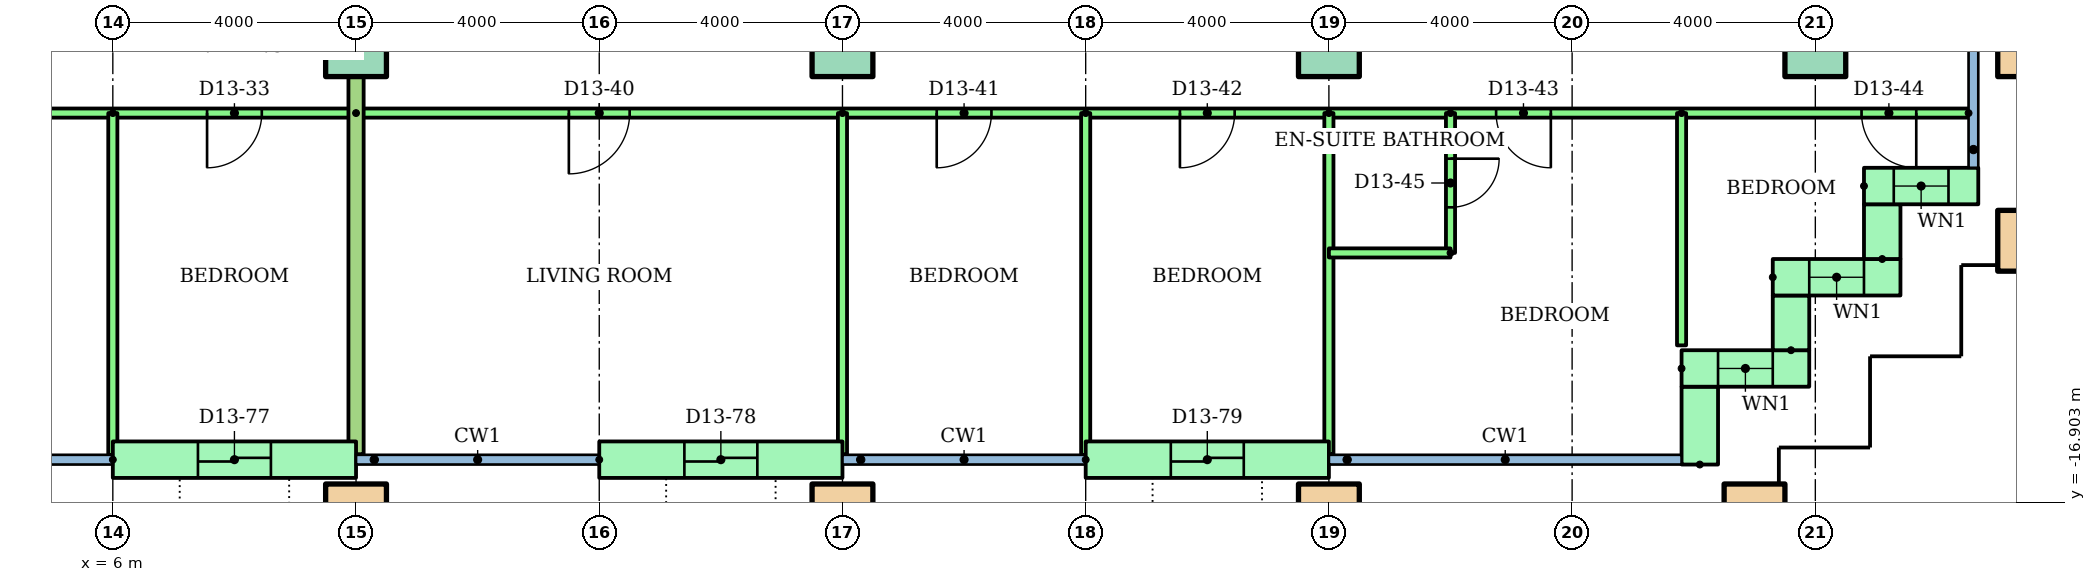
"""IFC4 building model, lengths in metres.
Left out: names, types, materials, properties, quantities, classifications, styles, units other than length and angle.
Written with IfcOpenShell. Run it as: python <this file> out.ifc"""

import sys

from ifc_helpers import new_model, si_unit, direction, frame, frame_2d, origin, origin_2d, place, context, subcontext, project, spatial, rectangle, hollow_rectangle, extrude, element, fill, save


model = new_model("IFC4")
c1 = context("Model", 3, precision=1e-05, world=origin(), true_north=direction((0.0, 1.0)))
c2 = subcontext(c1, "Body", "Model", "MODEL_VIEW")
j1 = project(units=[si_unit("LENGTHUNIT", "METRE"), si_unit("PLANEANGLEUNIT", "RADIAN")], contexts=[c1])
p1 = place(None, origin())
s1 = spatial("IfcSite", under=j1, at=p1, CompositionType="ELEMENT")
p2 = place(p1, origin())
s2 = spatial("IfcBuilding", under=s1, at=p2, CompositionType="ELEMENT")
p3 = place(p2, frame((0.0, 0.0, 51.2)))
s3 = spatial("IfcBuildingStorey", under=s2, at=p3, CompositionType="ELEMENT", Elevation=51.2)
for number, where in (
    (1, (10.0, -17.1, 0.0)),
    (2, (18.0, -17.1, 0.0)),
    (3, (26.0, -17.1, 0.0)),
    (4, (33.0, -17.1, 0.0)),
    (5, (37.5, -12.6, 0.0)),
):
    element("IfcColumn", number, at=place(p3, frame(where)), inside=s3, PredefinedType="COLUMN", context=c2, shape_type="SweptSolid", body=[
        extrude(hollow_rectangle(XDim=1.0, YDim=1.0, WallThickness=0.05, at=origin_2d()), origin(), (0.0, 0.0, 1.0), 3.2),
    ])
for number, where in (
    (6, (10.0, -9.4, 0.0)),
    (7, (18.0, -9.4, 0.0)),
    (8, (26.0, -9.4, 0.0)),
    (9, (34.0, -9.4, 0.0)),
):
    element("IfcColumn", number, at=place(p3, frame(where)), inside=s3, PredefinedType="COLUMN", context=c2, shape_type="SweptSolid", body=[
        extrude(rectangle(XDim=1.0, YDim=1.0, at=origin_2d()), origin(), (0.0, 0.0, 1.0), 3.2),
    ])
p4 = place(p3, frame((37.5, -9.4, 0.0)))
e10 = element("IfcColumn", 10, at=p4, inside=s3, PredefinedType="COLUMN", context=c2, shape_type="SweptSolid", body=[
    extrude(hollow_rectangle(XDim=1.0, YDim=1.0, WallThickness=0.05, at=origin_2d()), origin(), (0.0, 0.0, 1.0), 3.2),
])
p5 = place(p3, frame((6.0, -16.2, 0.0)))
e11 = element("IfcWall", 11, at=p5, inside=s3, PredefinedType="STANDARD", context=c2, shape_type="SweptSolid", body=[
    extrude(rectangle(XDim=4.0, YDim=0.6, at=frame_2d((2.0, 0.0))), origin(), (0.0, 0.0, 1.0), 2.92),
])
p6 = place(p5, frame((1.4, 0.0, 0.0)))
e12 = element("IfcOpeningElement", 12, at=p6, cuts=e11, PredefinedType="OPENING", context=c2, shape_type="SweptSolid", body=[
    extrude(rectangle(XDim=1.2, YDim=2.1, at=frame_2d((0.6, 1.05))), frame((0.0, 0.31, 0.0), z_axis=(0.0, -1.0, 0.0), x_axis=(1.0, 0.0, 0.0)), (0.0, 0.0, 1.0), 0.62),
])
p7 = place(p3, frame((14.0, -16.2, 0.0)))
e13 = element("IfcWall", 13, at=p7, inside=s3, PredefinedType="STANDARD", context=c2, shape_type="SweptSolid", body=[
    extrude(rectangle(XDim=4.0, YDim=0.6, at=frame_2d((2.0, 0.0))), origin(), (0.0, 0.0, 1.0), 2.92),
])
p8 = place(p7, frame((1.4, 0.0, 0.0)))
e14 = element("IfcOpeningElement", 14, at=p8, cuts=e13, PredefinedType="OPENING", context=c2, shape_type="SweptSolid", body=[
    extrude(rectangle(XDim=1.2, YDim=2.1, at=frame_2d((0.6, 1.05))), frame((0.0, 0.31, 0.0), z_axis=(0.0, -1.0, 0.0), x_axis=(1.0, 0.0, 0.0)), (0.0, 0.0, 1.0), 0.62),
])
p9 = place(p3, frame((22.0, -16.2, 0.0)))
e15 = element("IfcWall", 15, at=p9, inside=s3, PredefinedType="STANDARD", context=c2, shape_type="SweptSolid", body=[
    extrude(rectangle(XDim=4.0, YDim=0.6, at=frame_2d((2.0, 0.0))), origin(), (0.0, 0.0, 1.0), 2.92),
])
p10 = place(p9, frame((1.4, 0.0, 0.0)))
e16 = element("IfcOpeningElement", 16, at=p10, cuts=e15, PredefinedType="OPENING", context=c2, shape_type="SweptSolid", body=[
    extrude(rectangle(XDim=1.2, YDim=2.1, at=frame_2d((0.6, 1.05))), frame((0.0, 0.31, 0.0), z_axis=(0.0, -1.0, 0.0), x_axis=(1.0, 0.0, 0.0)), (0.0, 0.0, 1.0), 0.62),
])
p11 = place(p3, frame((32.1, -16.28, 0.0), z_axis=(0.0, 0.0, 1.0), x_axis=(0.0, 1.0, 0.0)))
e17 = element("IfcWall", 17, at=p11, inside=s3, PredefinedType="STANDARD", context=c2, shape_type="SweptSolid", body=[
    extrude(rectangle(XDim=1.28, YDim=0.6, at=frame_2d((0.64, 0.0))), origin(), (0.0, 0.0, 1.0), 2.92),
])
p12 = place(p3, frame((31.8, -14.7, 0.0)))
e18 = element("IfcWall", 18, at=p12, inside=s3, PredefinedType="STANDARD", context=c2, shape_type="SweptSolid", body=[
    extrude(rectangle(XDim=2.1, YDim=0.6, at=frame_2d((1.05, 0.0))), origin(), (0.0, 0.0, 1.0), 2.92),
])
p13 = place(p12, frame((0.6, 0.0, 0.9)))
e19 = element("IfcOpeningElement", 19, at=p13, cuts=e18, PredefinedType="OPENING", context=c2, shape_type="SweptSolid", body=[
    extrude(rectangle(XDim=0.9, YDim=1.5, at=frame_2d((0.45, 0.75))), frame((0.0, 0.31, 0.0), z_axis=(0.0, -1.0, 0.0), x_axis=(1.0, 0.0, 0.0)), (0.0, 0.0, 1.0), 0.62),
])
p14 = place(p3, frame((33.6, -14.4, 0.0), z_axis=(0.0, 0.0, 1.0), x_axis=(0.0, 1.0, 0.0)))
e20 = element("IfcWall", 20, at=p14, inside=s3, PredefinedType="STANDARD", context=c2, shape_type="SweptSolid", body=[
    extrude(rectangle(XDim=0.9, YDim=0.6, at=frame_2d((0.45, 0.0))), origin(), (0.0, 0.0, 1.0), 2.92),
])
p15 = place(p3, frame((33.3, -13.2, 0.0)))
e21 = element("IfcWall", 21, at=p15, inside=s3, PredefinedType="STANDARD", context=c2, shape_type="SweptSolid", body=[
    extrude(rectangle(XDim=2.1, YDim=0.6, at=frame_2d((1.05, 0.0))), origin(), (0.0, 0.0, 1.0), 2.92),
])
p16 = place(p15, frame((0.6, 0.0, 0.9)))
e22 = element("IfcOpeningElement", 22, at=p16, cuts=e21, PredefinedType="OPENING", context=c2, shape_type="SweptSolid", body=[
    extrude(rectangle(XDim=0.9, YDim=1.5, at=frame_2d((0.45, 0.75))), frame((0.0, 0.31, 0.0), z_axis=(0.0, -1.0, 0.0), x_axis=(1.0, 0.0, 0.0)), (0.0, 0.0, 1.0), 0.62),
])
p17 = place(p3, frame((35.1, -12.9, 0.0), z_axis=(0.0, 0.0, 1.0), x_axis=(0.0, 1.0, 0.0)))
e23 = element("IfcWall", 23, at=p17, inside=s3, PredefinedType="STANDARD", context=c2, shape_type="SweptSolid", body=[
    extrude(rectangle(XDim=0.9, YDim=0.6, at=frame_2d((0.45, 0.0))), origin(), (0.0, 0.0, 1.0), 2.92),
])
p18 = place(p3, frame((34.8, -11.7, 0.0)))
e24 = element("IfcWall", 24, at=p18, inside=s3, PredefinedType="STANDARD", context=c2, shape_type="SweptSolid", body=[
    extrude(rectangle(XDim=1.88, YDim=0.6, at=frame_2d((0.94, 0.0))), origin(), (0.0, 0.0, 1.0), 2.92),
])
p19 = place(p18, frame((0.49, 0.0, 0.9)))
e25 = element("IfcOpeningElement", 25, at=p19, cuts=e24, PredefinedType="OPENING", context=c2, shape_type="SweptSolid", body=[
    extrude(rectangle(XDim=0.9, YDim=1.5, at=frame_2d((0.45, 0.75))), frame((0.0, 0.31, 0.0), z_axis=(0.0, -1.0, 0.0), x_axis=(1.0, 0.0, 0.0)), (0.0, 0.0, 1.0), 0.62),
])
p20 = place(p3, frame((10.0, -10.5, 0.0), z_axis=(0.0, 0.0, 1.0), x_axis=(-1.0, 0.0, 0.0)))
e26 = element("IfcWall", 26, at=p20, inside=s3, PredefinedType="PARTITIONING", context=c2, shape_type="SweptSolid", body=[
    extrude(rectangle(XDim=24.0, YDim=0.15, at=frame_2d((12.0, 0.0))), origin(), (0.0, 0.0, 1.0), 2.4),
])
p21 = place(p20, frame((19.5, 0.0, 0.0)))
e27 = element("IfcOpeningElement", 27, at=p21, cuts=e26, PredefinedType="OPENING", context=c2, shape_type="SweptSolid", body=[
    extrude(rectangle(XDim=1.0, YDim=2.1, at=frame_2d((0.5, 1.05))), frame((0.0, 0.085, 0.0), z_axis=(0.0, -1.0, 0.0), x_axis=(1.0, 0.0, 0.0)), (0.0, 0.0, 1.0), 0.17),
])
p22 = place(p20, frame((13.55, 0.0, 0.0)))
e28 = element("IfcOpeningElement", 28, at=p22, cuts=e26, PredefinedType="OPENING", context=c2, shape_type="SweptSolid", body=[
    extrude(rectangle(XDim=0.9, YDim=2.1, at=frame_2d((0.45, 1.05))), frame((0.0, 0.085, 0.0), z_axis=(0.0, -1.0, 0.0), x_axis=(1.0, 0.0, 0.0)), (0.0, 0.0, 1.0), 0.17),
])
p23 = place(p20, frame((9.55, 0.0, 0.0)))
e29 = element("IfcOpeningElement", 29, at=p23, cuts=e26, PredefinedType="OPENING", context=c2, shape_type="SweptSolid", body=[
    extrude(rectangle(XDim=0.9, YDim=2.1, at=frame_2d((0.45, 1.05))), frame((0.0, 0.085, 0.0), z_axis=(0.0, -1.0, 0.0), x_axis=(1.0, 0.0, 0.0)), (0.0, 0.0, 1.0), 0.17),
])
p24 = place(p20, frame((5.55, 0.0, 0.0)))
e30 = element("IfcOpeningElement", 30, at=p24, cuts=e26, PredefinedType="OPENING", context=c2, shape_type="SweptSolid", body=[
    extrude(rectangle(XDim=0.9, YDim=2.1, at=frame_2d((0.45, 1.05))), frame((0.0, 0.085, 0.0), z_axis=(0.0, -1.0, 0.0), x_axis=(1.0, 0.0, 0.0)), (0.0, 0.0, 1.0), 0.17),
])
p25 = place(p20, frame((1.55, 0.0, 0.0)))
e31 = element("IfcOpeningElement", 31, at=p25, cuts=e26, PredefinedType="OPENING", context=c2, shape_type="SweptSolid", body=[
    extrude(rectangle(XDim=0.9, YDim=2.1, at=frame_2d((0.45, 1.05))), frame((0.0, 0.085, 0.0), z_axis=(0.0, -1.0, 0.0), x_axis=(1.0, 0.0, 0.0)), (0.0, 0.0, 1.0), 0.17),
])
p26 = place(p3, frame((6.0, -10.5, 0.0), z_axis=(0.0, 0.0, 1.0), x_axis=(0.0, -1.0, 0.0)))
e32 = element("IfcWall", 32, at=p26, inside=s3, PredefinedType="PARTITIONING", context=c2, shape_type="SweptSolid", body=[
    extrude(rectangle(XDim=5.621, YDim=0.15, at=frame_2d((2.811, 0.0))), origin(), (0.0, 0.0, 1.0), 2.4),
])
p27 = place(p3, frame((36.52, -10.5, 0.0), z_axis=(0.0, 0.0, 1.0), x_axis=(-1.0, 0.0, 0.0)))
e33 = element("IfcWall", 33, at=p27, inside=s3, PredefinedType="PARTITIONING", context=c2, shape_type="SweptSolid", body=[
    extrude(rectangle(XDim=26.52, YDim=0.15, at=frame_2d((13.26, 0.0))), origin(), (0.0, 0.0, 1.0), 2.4),
])
p28 = place(p27, frame((22.02, 0.0, 0.0)))
e34 = element("IfcOpeningElement", 34, at=p28, cuts=e33, PredefinedType="OPENING", context=c2, shape_type="SweptSolid", body=[
    extrude(rectangle(XDim=1.0, YDim=2.1, at=frame_2d((0.5, 1.05))), frame((0.0, 0.085, 0.0), z_axis=(0.0, -1.0, 0.0), x_axis=(1.0, 0.0, 0.0)), (0.0, 0.0, 1.0), 0.17),
])
p29 = place(p27, frame((16.07, 0.0, 0.0)))
e35 = element("IfcOpeningElement", 35, at=p29, cuts=e33, PredefinedType="OPENING", context=c2, shape_type="SweptSolid", body=[
    extrude(rectangle(XDim=0.9, YDim=2.1, at=frame_2d((0.45, 1.05))), frame((0.0, 0.085, 0.0), z_axis=(0.0, -1.0, 0.0), x_axis=(1.0, 0.0, 0.0)), (0.0, 0.0, 1.0), 0.17),
])
p30 = place(p27, frame((12.07, 0.0, 0.0)))
e36 = element("IfcOpeningElement", 36, at=p30, cuts=e33, PredefinedType="OPENING", context=c2, shape_type="SweptSolid", body=[
    extrude(rectangle(XDim=0.9, YDim=2.1, at=frame_2d((0.45, 1.05))), frame((0.0, 0.085, 0.0), z_axis=(0.0, -1.0, 0.0), x_axis=(1.0, 0.0, 0.0)), (0.0, 0.0, 1.0), 0.17),
])
p31 = place(p27, frame((6.87, 0.0, 0.0)))
e37 = element("IfcOpeningElement", 37, at=p31, cuts=e33, PredefinedType="OPENING", context=c2, shape_type="SweptSolid", body=[
    extrude(rectangle(XDim=0.9, YDim=2.1, at=frame_2d((0.45, 1.05))), frame((0.0, 0.085, 0.0), z_axis=(0.0, -1.0, 0.0), x_axis=(1.0, 0.0, 0.0)), (0.0, 0.0, 1.0), 0.17),
])
p32 = place(p27, frame((0.86, 0.0, 0.0)))
e38 = element("IfcOpeningElement", 38, at=p32, cuts=e33, PredefinedType="OPENING", context=c2, shape_type="SweptSolid", body=[
    extrude(rectangle(XDim=0.9, YDim=2.1, at=frame_2d((0.45, 1.05))), frame((0.0, 0.085, 0.0), z_axis=(0.0, -1.0, 0.0), x_axis=(1.0, 0.0, 0.0)), (0.0, 0.0, 1.0), 0.17),
])
p33 = place(p3, frame((18.0, -10.5, 0.0), z_axis=(0.0, 0.0, 1.0), x_axis=(0.0, -1.0, 0.0)))
e39 = element("IfcWall", 39, at=p33, inside=s3, PredefinedType="PARTITIONING", context=c2, shape_type="SweptSolid", body=[
    extrude(rectangle(XDim=5.61, YDim=0.15, at=frame_2d((2.805, 0.0))), origin(), (0.0, 0.0, 1.0), 2.4),
])
p34 = place(p3, frame((22.0, -10.5, 0.0), z_axis=(0.0, 0.0, 1.0), x_axis=(0.0, -1.0, 0.0)))
e40 = element("IfcWall", 40, at=p34, inside=s3, PredefinedType="PARTITIONING", context=c2, shape_type="SweptSolid", body=[
    extrude(rectangle(XDim=5.621, YDim=0.15, at=frame_2d((2.811, 0.0))), origin(), (0.0, 0.0, 1.0), 2.4),
])
p35 = place(p3, frame((26.0, -10.5, 0.0), z_axis=(0.0, 0.0, 1.0), x_axis=(0.0, -1.0, 0.0)))
e41 = element("IfcWall", 41, at=p35, inside=s3, PredefinedType="PARTITIONING", context=c2, shape_type="SweptSolid", body=[
    extrude(rectangle(XDim=5.61, YDim=0.15, at=frame_2d((2.805, 0.0))), origin(), (0.0, 0.0, 1.0), 2.4),
])
p36 = place(p3, frame((31.8, -10.5, 0.0), z_axis=(0.0, 0.0, 1.0), x_axis=(0.0, -1.0, 0.0)))
e42 = element("IfcWall", 42, at=p36, inside=s3, PredefinedType="PARTITIONING", context=c2, shape_type="SweptSolid", body=[
    extrude(rectangle(XDim=3.82, YDim=0.15, at=frame_2d((1.91, 0.0))), origin(), (0.0, 0.0, 1.0), 2.4),
])
p37 = place(p3, frame((28.0, -10.5, 0.0), z_axis=(0.0, 0.0, 1.0), x_axis=(0.0, -1.0, 0.0)))
e43 = element("IfcWall", 43, at=p37, inside=s3, PredefinedType="PARTITIONING", context=c2, shape_type="SweptSolid", body=[
    extrude(rectangle(XDim=2.3, YDim=0.15, at=frame_2d((1.15, 0.0))), origin(), (0.0, 0.0, 1.0), 2.4),
])
p38 = place(p37, frame((0.75, 0.0, 0.0)))
e44 = element("IfcOpeningElement", 44, at=p38, cuts=e43, PredefinedType="OPENING", context=c2, shape_type="SweptSolid", body=[
    extrude(rectangle(XDim=0.8, YDim=2.1, at=frame_2d((0.4, 1.05))), frame((0.0, 0.085, 0.0), z_axis=(0.0, -1.0, 0.0), x_axis=(1.0, 0.0, 0.0)), (0.0, 0.0, 1.0), 0.17),
])
p39 = place(p3, frame((28.0, -12.8, 0.0), z_axis=(0.0, 0.0, 1.0), x_axis=(-1.0, 0.0, 0.0)))
e45 = element("IfcWall", 45, at=p39, inside=s3, PredefinedType="PARTITIONING", context=c2, shape_type="SweptSolid", body=[
    extrude(rectangle(XDim=2.0, YDim=0.15, at=frame_2d((1.0, 0.0))), origin(), (0.0, 0.0, 1.0), 2.4),
])
p40 = place(p3, frame((10.0, -1.4, 0.0), z_axis=(0.0, 0.0, 1.0), x_axis=(0.0, -1.0, 0.0)))
e46 = element("IfcWall", 46, at=p40, inside=s3, PredefinedType="PARTITIONING", context=c2, shape_type="SweptSolid", body=[
    extrude(rectangle(XDim=14.71, YDim=0.25, at=frame_2d((7.355, 0.0))), origin(), (0.0, 0.0, 1.0), 2.4),
])
p41 = place(p13, origin())
e47 = element("IfcWindow", 47, at=p41, inside=s3, PartitioningType="SINGLE_PANEL", PredefinedType="WINDOW", context=c2, shape_type="SweptSolid", body=[
    extrude(rectangle(XDim=0.9, YDim=1.5, at=frame_2d((0.45, 0.75))), frame((0.0, 0.03, 0.0), z_axis=(0.0, -1.0, 0.0), x_axis=(1.0, 0.0, 0.0)), (0.0, 0.0, 1.0), 0.06),
])
fill(e19, e47)
p42 = place(p16, origin())
e48 = element("IfcWindow", 48, at=p42, inside=s3, PartitioningType="SINGLE_PANEL", PredefinedType="WINDOW", context=c2, shape_type="SweptSolid", body=[
    extrude(rectangle(XDim=0.9, YDim=1.5, at=frame_2d((0.45, 0.75))), frame((0.0, 0.03, 0.0), z_axis=(0.0, -1.0, 0.0), x_axis=(1.0, 0.0, 0.0)), (0.0, 0.0, 1.0), 0.06),
])
fill(e22, e48)
p43 = place(p19, origin())
e49 = element("IfcWindow", 49, at=p43, inside=s3, PartitioningType="SINGLE_PANEL", PredefinedType="WINDOW", context=c2, shape_type="SweptSolid", body=[
    extrude(rectangle(XDim=0.9, YDim=1.5, at=frame_2d((0.45, 0.75))), frame((0.0, 0.03, 0.0), z_axis=(0.0, -1.0, 0.0), x_axis=(1.0, 0.0, 0.0)), (0.0, 0.0, 1.0), 0.06),
])
fill(e25, e49)
p44 = place(p25, origin())
e50 = element("IfcDoor", 50, at=p44, inside=s3, OperationType="SINGLE_SWING_RIGHT", PredefinedType="DOOR", context=c2, shape_type="SweptSolid", body=[
    extrude(rectangle(XDim=0.9, YDim=2.1, at=frame_2d((0.45, 1.05))), frame((0.0, 0.025, 0.0), z_axis=(0.0, -1.0, 0.0), x_axis=(1.0, 0.0, 0.0)), (0.0, 0.0, 1.0), 0.05),
])
fill(e31, e50)
p45 = place(p28, origin())
e51 = element("IfcDoor", 51, at=p45, inside=s3, OperationType="SINGLE_SWING_RIGHT", PredefinedType="DOOR", context=c2, shape_type="SweptSolid", body=[
    extrude(rectangle(XDim=1.0, YDim=2.1, at=frame_2d((0.5, 1.05))), frame((0.0, 0.025, 0.0), z_axis=(0.0, -1.0, 0.0), x_axis=(1.0, 0.0, 0.0)), (0.0, 0.0, 1.0), 0.05),
])
fill(e34, e51)
p46 = place(p29, origin())
e52 = element("IfcDoor", 52, at=p46, inside=s3, OperationType="SINGLE_SWING_RIGHT", PredefinedType="DOOR", context=c2, shape_type="SweptSolid", body=[
    extrude(rectangle(XDim=0.9, YDim=2.1, at=frame_2d((0.45, 1.05))), frame((0.0, 0.025, 0.0), z_axis=(0.0, -1.0, 0.0), x_axis=(1.0, 0.0, 0.0)), (0.0, 0.0, 1.0), 0.05),
])
fill(e35, e52)
p47 = place(p30, origin())
e53 = element("IfcDoor", 53, at=p47, inside=s3, OperationType="SINGLE_SWING_RIGHT", PredefinedType="DOOR", context=c2, shape_type="SweptSolid", body=[
    extrude(rectangle(XDim=0.9, YDim=2.1, at=frame_2d((0.45, 1.05))), frame((0.0, 0.025, 0.0), z_axis=(0.0, -1.0, 0.0), x_axis=(1.0, 0.0, 0.0)), (0.0, 0.0, 1.0), 0.05),
])
fill(e36, e53)
p48 = place(p31, origin())
e54 = element("IfcDoor", 54, at=p48, inside=s3, OperationType="SINGLE_SWING_LEFT", PredefinedType="DOOR", context=c2, shape_type="SweptSolid", body=[
    extrude(rectangle(XDim=0.9, YDim=2.1, at=frame_2d((0.45, 1.05))), frame((0.0, 0.025, 0.0), z_axis=(0.0, -1.0, 0.0), x_axis=(1.0, 0.0, 0.0)), (0.0, 0.0, 1.0), 0.05),
])
fill(e37, e54)
p49 = place(p32, origin())
e55 = element("IfcDoor", 55, at=p49, inside=s3, OperationType="SINGLE_SWING_LEFT", PredefinedType="DOOR", context=c2, shape_type="SweptSolid", body=[
    extrude(rectangle(XDim=0.9, YDim=2.1, at=frame_2d((0.45, 1.05))), frame((0.0, 0.025, 0.0), z_axis=(0.0, -1.0, 0.0), x_axis=(1.0, 0.0, 0.0)), (0.0, 0.0, 1.0), 0.05),
])
fill(e38, e55)
p50 = place(p38, origin())
e56 = element("IfcDoor", 56, at=p50, inside=s3, OperationType="SINGLE_SWING_LEFT", PredefinedType="DOOR", context=c2, shape_type="SweptSolid", body=[
    extrude(rectangle(XDim=0.8, YDim=2.1, at=frame_2d((0.4, 1.05))), frame((0.0, 0.025, 0.0), z_axis=(0.0, -1.0, 0.0), x_axis=(1.0, 0.0, 0.0)), (0.0, 0.0, 1.0), 0.05),
])
fill(e44, e56)
p51 = place(p6, origin())
e57 = element("IfcDoor", 57, at=p51, inside=s3, OperationType="SLIDING_TO_LEFT", PredefinedType="DOOR", context=c2, shape_type="SweptSolid", body=[
    extrude(rectangle(XDim=1.2, YDim=2.1, at=frame_2d((0.6, 1.05))), frame((0.0, 0.025, 0.0), z_axis=(0.0, -1.0, 0.0), x_axis=(1.0, 0.0, 0.0)), (0.0, 0.0, 1.0), 0.05),
])
fill(e12, e57)
p52 = place(p8, origin())
e58 = element("IfcDoor", 58, at=p52, inside=s3, OperationType="SLIDING_TO_LEFT", PredefinedType="DOOR", context=c2, shape_type="SweptSolid", body=[
    extrude(rectangle(XDim=1.2, YDim=2.1, at=frame_2d((0.6, 1.05))), frame((0.0, 0.025, 0.0), z_axis=(0.0, -1.0, 0.0), x_axis=(1.0, 0.0, 0.0)), (0.0, 0.0, 1.0), 0.05),
])
fill(e14, e58)
p53 = place(p10, origin())
e59 = element("IfcDoor", 59, at=p53, inside=s3, OperationType="SLIDING_TO_LEFT", PredefinedType="DOOR", context=c2, shape_type="SweptSolid", body=[
    extrude(rectangle(XDim=1.2, YDim=2.1, at=frame_2d((0.6, 1.05))), frame((0.0, 0.025, 0.0), z_axis=(0.0, -1.0, 0.0), x_axis=(1.0, 0.0, 0.0)), (0.0, 0.0, 1.0), 0.05),
])
fill(e16, e59)
save(model, sys.argv[1])
